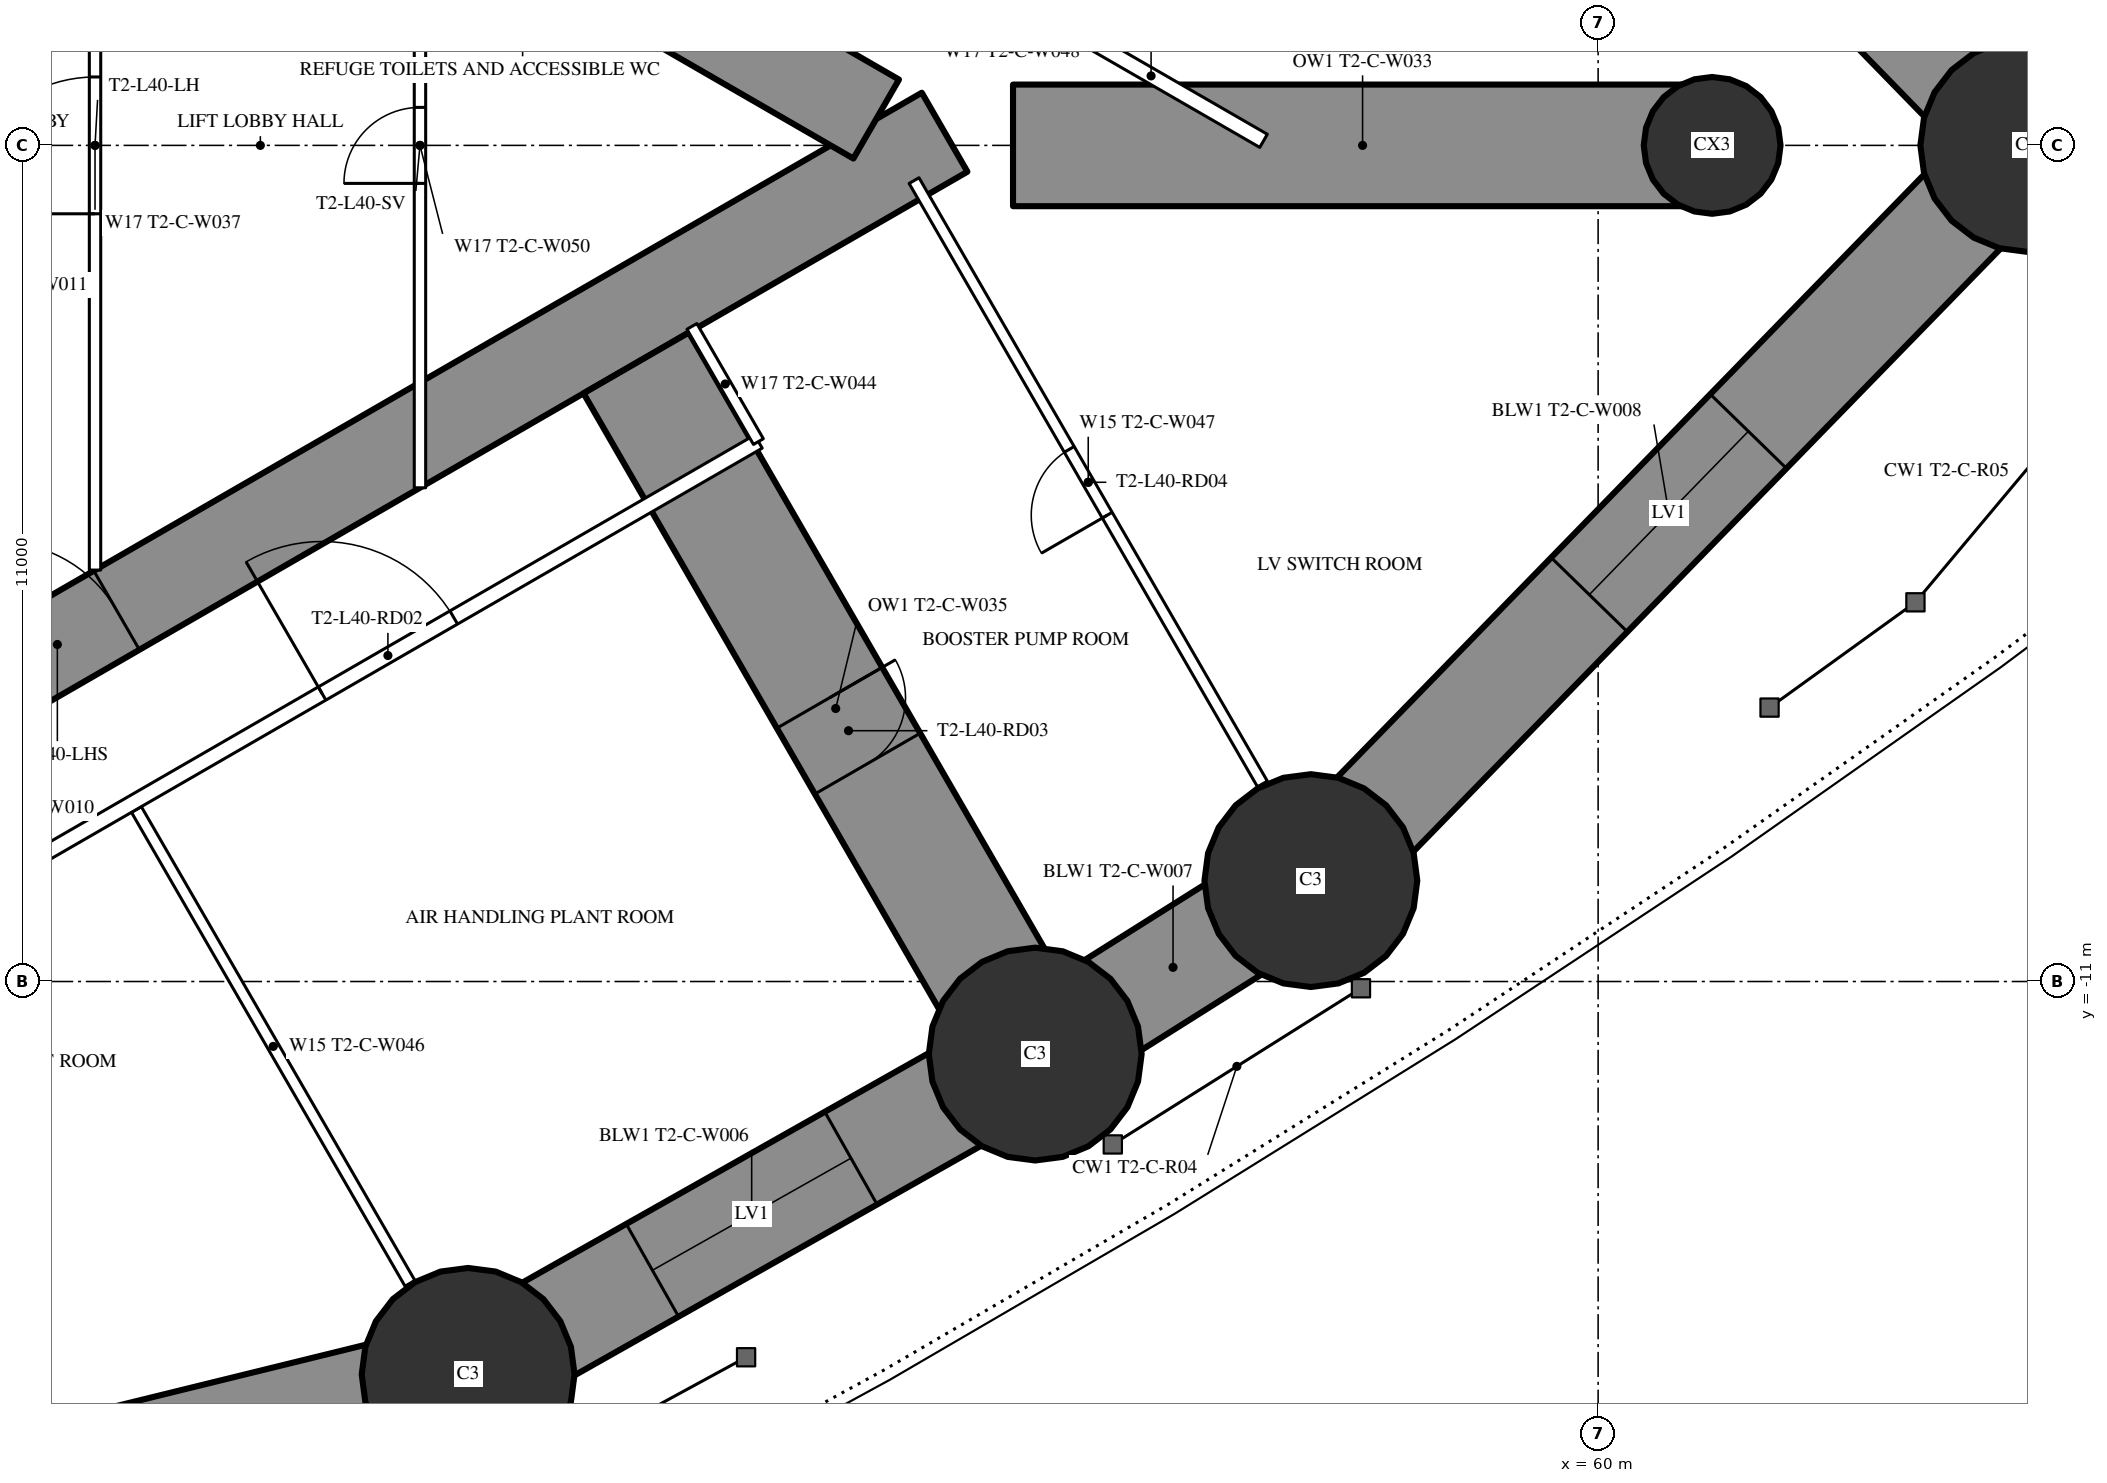
"""IFC4 building model, lengths in metres.
Left out: names, types, materials, properties, quantities, classifications, styles, units other than length and angle.
Written with IfcOpenShell. Run it as: python <this file> out.ifc"""

import sys

from ifc_helpers import new_model, si_unit, direction, frame, frame_2d, origin, origin_2d, place, context, subcontext, project, spatial, rectangle, circle, extrude, element, fill, save


model = new_model("IFC4")
c1 = context("Model", 3, precision=1e-05, world=origin(), true_north=direction((0.0, 1.0)))
c2 = subcontext(c1, "Body", "Model", "MODEL_VIEW")
j1 = project(units=[si_unit("LENGTHUNIT", "METRE"), si_unit("PLANEANGLEUNIT", "RADIAN")], contexts=[c1])
p1 = place(None, origin())
s1 = spatial("IfcSite", under=j1, at=p1, CompositionType="ELEMENT")
p2 = place(p1, origin())
s2 = spatial("IfcBuilding", under=s1, at=p2, CompositionType="ELEMENT")
p3 = place(p2, frame((0.0, 0.0, 152.7)))
s3 = spatial("IfcBuildingStorey", under=s2, at=p3, CompositionType="ELEMENT", Elevation=152.7)
for number, where, z_axis, x_axis in (
    (1, (65.64, 0.0, 0.0), (0.0, 0.0, 1.0), (1.0, 0.0, 0.0)),
    (2, (45.134, -16.168, 0.0), (0.0, 0.0, 1.0), (1.0, 0.0, 0.0)),
    (3, (52.594, -11.955, 0.0), (0.0, 0.0, 1.0), (1.0, 0.0, 0.0)),
    (4, (56.221, -9.672, 0.0), (0.0, 0.0, 1.0), (1.0, 0.0, 0.0)),
):
    element("IfcColumn", number, at=place(p3, frame(where, z_axis=z_axis, x_axis=x_axis)), inside=s3, PredefinedType="COLUMN", context=c2, shape_type="SweptSolid", body=[
        extrude(circle(Radius=1.4, at=origin_2d()), origin(), (0.0, 0.0, 1.0), 3.6),
    ])
p4 = place(p3, frame((61.5, 0.0, 0.0), z_axis=(0.0, 0.0, 1.0), x_axis=(1.0, 0.0, 0.0)))
e5 = element("IfcColumn", 5, at=p4, inside=s3, PredefinedType="COLUMN", context=c2, shape_type="SweptSolid", body=[
    extrude(circle(Radius=0.9, at=origin_2d()), origin(), (0.0, 0.0, 1.0), 3.6),
])
p5 = place(p3, frame((27.2, -13.8, 0.0), z_axis=(0.0, 0.0, 1.0), x_axis=(0.866027159892, 0.499996958321, 0.0)))
e6 = element("IfcWall", 6, at=p5, inside=s3, PredefinedType="SHEAR", context=c2, shape_type="SweptSolid", body=[
    extrude(rectangle(XDim=27.947, YDim=1.2, at=frame_2d((13.973, 0.0))), origin(), (0.0, 0.0, 1.0), 3.6),
])
p6 = place(p5, frame((4.6, 0.0, 0.0)))
e7 = element("IfcOpeningElement", 7, at=p6, cuts=e6, PredefinedType="OPENING", context=c2, shape_type="SweptSolid", body=[
    extrude(rectangle(XDim=1.0, YDim=2.2, at=frame_2d((0.5, 1.1))), frame((0.0, 0.61, 0.0), z_axis=(0.0, -1.0, 0.0), x_axis=(1.0, 0.0, 0.0)), (0.0, 0.0, 1.0), 1.22),
])
p7 = place(p5, frame((13.568, 0.0, 0.0)))
e8 = element("IfcOpeningElement", 8, at=p7, cuts=e6, PredefinedType="OPENING", context=c2, shape_type="SweptSolid", body=[
    extrude(rectangle(XDim=1.8, YDim=2.04, at=frame_2d((0.9, 1.02))), frame((0.0, 0.61, 0.0), z_axis=(0.0, -1.0, 0.0), x_axis=(1.0, 0.0, 0.0)), (0.0, 0.0, 1.0), 1.22),
])
p8 = place(p3, frame((27.2, 13.8, 0.0), z_axis=(0.0, 0.0, 1.0), x_axis=(0.866024515034, -0.500001539357, 0.0)))
e9 = element("IfcWall", 9, at=p8, inside=s3, PredefinedType="SHEAR", context=c2, shape_type="SweptSolid", body=[
    extrude(rectangle(XDim=26.907, YDim=1.2, at=frame_2d((13.454, 0.0))), origin(), (0.0, 0.0, 1.0), 3.6),
])
p9 = place(p8, frame((4.6, 0.0, 0.0)))
e10 = element("IfcOpeningElement", 10, at=p9, cuts=e9, PredefinedType="OPENING", context=c2, shape_type="SweptSolid", body=[
    extrude(rectangle(XDim=1.0, YDim=2.2, at=frame_2d((0.5, 1.1))), frame((0.0, 0.61, 0.0), z_axis=(0.0, -1.0, 0.0), x_axis=(1.0, 0.0, 0.0)), (0.0, 0.0, 1.0), 1.22),
])
p10 = place(p8, frame((13.568, 0.0, 0.0)))
e11 = element("IfcOpeningElement", 11, at=p10, cuts=e9, PredefinedType="OPENING", context=c2, shape_type="SweptSolid", body=[
    extrude(rectangle(XDim=1.8, YDim=2.04, at=frame_2d((0.9, 1.02))), frame((0.0, 0.61, 0.0), z_axis=(0.0, -1.0, 0.0), x_axis=(1.0, 0.0, 0.0)), (0.0, 0.0, 1.0), 1.22),
])
p11 = place(p3, frame((47.345, -2.862, 0.0), z_axis=(0.0, 0.0, 1.0), x_axis=(0.500012973899, -0.866017913171, 0.0)))
e12 = element("IfcWall", 12, at=p11, inside=s3, PredefinedType="SHEAR", context=c2, shape_type="SweptSolid", body=[
    extrude(rectangle(XDim=10.499, YDim=1.6, at=frame_2d((5.25, 0.0))), origin(), (0.0, 0.0, 1.0), 3.6),
])
p12 = place(p11, frame((5.087, 0.0, 0.0)))
e13 = element("IfcOpeningElement", 13, at=p12, cuts=e12, PredefinedType="OPENING", context=c2, shape_type="SweptSolid", body=[
    extrude(rectangle(XDim=1.0, YDim=2.2, at=frame_2d((0.5, 1.1))), frame((0.0, 0.81, 0.0), z_axis=(0.0, -1.0, 0.0), x_axis=(1.0, 0.0, 0.0)), (0.0, 0.0, 1.0), 1.62),
])
p13 = place(p3, frame((52.302, 0.0, 0.0), z_axis=(0.0, 0.0, 1.0), x_axis=(1.0, 0.0, 0.0)))
e14 = element("IfcWall", 14, at=p13, inside=s3, PredefinedType="SHEAR", context=c2, shape_type="SweptSolid", body=[
    extrude(rectangle(XDim=9.198, YDim=1.6, at=frame_2d((4.599, 0.0))), origin(), (0.0, 0.0, 1.0), 3.6),
])
p14 = place(p3, frame((31.76, -19.456, 0.0), z_axis=(0.0, 0.0, 1.0), x_axis=(0.971093253227, 0.238700426344, 0.0)))
e15 = element("IfcWall", 15, at=p14, inside=s3, PredefinedType="SHEAR", context=c2, shape_type="SweptSolid", body=[
    extrude(rectangle(XDim=13.772, YDim=1.4, at=frame_2d((6.886, 0.0))), origin(), (0.0, 0.0, 1.0), 3.6),
])
p15 = place(p14, frame((5.386, 0.0, 0.6)))
e16 = element("IfcOpeningElement", 16, at=p15, cuts=e15, PredefinedType="OPENING", context=c2, shape_type="SweptSolid", body=[
    extrude(rectangle(XDim=3.0, YDim=1.2, at=frame_2d((1.5, 0.6))), frame((0.0, 0.71, 0.0), z_axis=(0.0, -1.0, 0.0), x_axis=(1.0, 0.0, 0.0)), (0.0, 0.0, 1.0), 1.42),
])
p16 = place(p3, frame((45.134, -16.168, 0.0), z_axis=(0.0, 0.0, 1.0), x_axis=(0.870721990329, 0.491775574381, 0.0)))
e17 = element("IfcWall", 17, at=p16, inside=s3, PredefinedType="SHEAR", context=c2, shape_type="SweptSolid", body=[
    extrude(rectangle(XDim=8.569, YDim=1.4, at=frame_2d((4.284, 0.0))), origin(), (0.0, 0.0, 1.0), 3.6),
])
p17 = place(p16, frame((2.784, 0.0, 0.6)))
e18 = element("IfcOpeningElement", 18, at=p17, cuts=e17, PredefinedType="OPENING", context=c2, shape_type="SweptSolid", body=[
    extrude(rectangle(XDim=3.0, YDim=1.2, at=frame_2d((1.5, 0.6))), frame((0.0, 0.71, 0.0), z_axis=(0.0, -1.0, 0.0), x_axis=(1.0, 0.0, 0.0)), (0.0, 0.0, 1.0), 1.42),
])
p18 = place(p3, frame((52.594, -11.955, 0.0), z_axis=(0.0, 0.0, 1.0), x_axis=(0.846348902569, 0.532628890617, 0.0)))
e19 = element("IfcWall", 19, at=p18, inside=s3, PredefinedType="SHEAR", context=c2, shape_type="SweptSolid", body=[
    extrude(rectangle(XDim=4.285, YDim=1.4, at=frame_2d((2.143, 0.0))), origin(), (0.0, 0.0, 1.0), 3.6),
])
p19 = place(p3, frame((56.221, -9.672, 0.0), z_axis=(0.0, 0.0, 1.0), x_axis=(0.697649905443, 0.716438838587, 0.0)))
e20 = element("IfcWall", 20, at=p19, inside=s3, PredefinedType="SHEAR", context=c2, shape_type="SweptSolid", body=[
    extrude(rectangle(XDim=13.501, YDim=1.4, at=frame_2d((6.75, 0.0))), origin(), (0.0, 0.0, 1.0), 3.6),
])
p20 = place(p19, frame((5.25, 0.0, 0.6)))
e21 = element("IfcOpeningElement", 21, at=p20, cuts=e20, PredefinedType="OPENING", context=c2, shape_type="SweptSolid", body=[
    extrude(rectangle(XDim=3.0, YDim=1.2, at=frame_2d((1.5, 0.6))), frame((0.0, 0.71, 0.0), z_axis=(0.0, -1.0, 0.0), x_axis=(1.0, 0.0, 0.0)), (0.0, 0.0, 1.0), 1.42),
])
p21 = place(p3, frame((65.64, 0.0, 0.0), z_axis=(0.0, 0.0, 1.0), x_axis=(-0.697649905443, 0.716438838587, 0.0)))
e22 = element("IfcWall", 22, at=p21, inside=s3, PredefinedType="SHEAR", context=c2, shape_type="SweptSolid", body=[
    extrude(rectangle(XDim=13.501, YDim=1.4, at=frame_2d((6.75, 0.0))), origin(), (0.0, 0.0, 1.0), 3.6),
])
p22 = place(p21, frame((5.25, 0.0, 0.6)))
e23 = element("IfcOpeningElement", 23, at=p22, cuts=e22, PredefinedType="OPENING", context=c2, shape_type="SweptSolid", body=[
    extrude(rectangle(XDim=3.0, YDim=1.2, at=frame_2d((1.5, 0.6))), frame((0.0, 0.71, 0.0), z_axis=(0.0, -1.0, 0.0), x_axis=(1.0, 0.0, 0.0)), (0.0, 0.0, 1.0), 1.42),
])
p23 = place(p3, frame((40.769, -8.737, 0.0), z_axis=(0.0, 0.0, 1.0), x_axis=(0.500013115284, -0.866017831539, 0.0)))
e24 = element("IfcWall", 24, at=p23, inside=s3, PredefinedType="PARTITIONING", context=c2, shape_type="SweptSolid", body=[
    extrude(rectangle(XDim=7.198, YDim=0.15, at=frame_2d((3.599, 0.0))), origin(), (0.0, 0.0, 1.0), 2.4),
])
p24 = place(p3, frame((55.583, -8.401, 0.0), z_axis=(0.0, 0.0, 1.0), x_axis=(-0.499997575924, 0.866026803321, 0.0)))
e25 = element("IfcWall", 25, at=p24, inside=s3, PredefinedType="PARTITIONING", context=c2, shape_type="SweptSolid", body=[
    extrude(rectangle(XDim=9.167, YDim=0.15, at=frame_2d((4.583, 0.0))), origin(), (0.0, 0.0, 1.0), 3.35),
])
p25 = place(p24, frame((4.083, 0.0, 0.0)))
e26 = element("IfcOpeningElement", 26, at=p25, cuts=e25, PredefinedType="OPENING", context=c2, shape_type="SweptSolid", body=[
    extrude(rectangle(XDim=1.0, YDim=2.2, at=frame_2d((0.5, 1.1))), frame((0.0, 0.085, 0.0), z_axis=(0.0, -1.0, 0.0), x_axis=(1.0, 0.0, 0.0)), (0.0, 0.0, 1.0), 0.17),
])
p26 = place(p3, frame((52.639, 1.769, 0.0), z_axis=(0.0, 0.0, 1.0), x_axis=(0.866027340901, -0.4999966448, 0.0)))
e27 = element("IfcWall", 27, at=p26, inside=s3, PredefinedType="PARTITIONING", context=c2, shape_type="SweptSolid", body=[
    extrude(rectangle(XDim=3.417, YDim=0.2, at=frame_2d((1.708, 0.0))), origin(), (0.0, 0.0, 1.0), 3.35),
])
p27 = place(p3, frame((27.903, -16.05, 0.0), z_axis=(0.0, 0.0, 1.0), x_axis=(0.86602417537, 0.500002127671, 0.0)))
e28 = element("IfcWall", 28, at=p27, inside=s3, PredefinedType="PARTITIONING", context=c2, shape_type="SweptSolid", body=[
    extrude(rectangle(XDim=24.307, YDim=0.2, at=frame_2d((12.153, 0.0))), origin(), (0.0, 0.0, 1.0), 3.35),
])
p28 = place(p27, frame((4.162, 0.0, 0.0)))
e29 = element("IfcOpeningElement", 29, at=p28, cuts=e28, PredefinedType="OPENING", context=c2, shape_type="SweptSolid", body=[
    extrude(rectangle(XDim=2.0, YDim=2.4, at=frame_2d((1.0, 1.2))), frame((0.0, 0.11, 0.0), z_axis=(0.0, -1.0, 0.0), x_axis=(1.0, 0.0, 0.0)), (0.0, 0.0, 1.0), 0.22),
])
p29 = place(p27, frame((17.678, 0.0, 0.0)))
e30 = element("IfcOpeningElement", 30, at=p29, cuts=e28, PredefinedType="OPENING", context=c2, shape_type="SweptSolid", body=[
    extrude(rectangle(XDim=2.0, YDim=2.4, at=frame_2d((1.0, 1.2))), frame((0.0, 0.11, 0.0), z_axis=(0.0, -1.0, 0.0), x_axis=(1.0, 0.0, 0.0)), (0.0, 0.0, 1.0), 0.22),
])
p30 = place(p3, frame((48.953, -3.897, 0.0), z_axis=(0.0, 0.0, 1.0), x_axis=(-0.499980071345, 0.866036909293, 0.0)))
e31 = element("IfcWall", 31, at=p30, inside=s3, PredefinedType="PARTITIONING", context=c2, shape_type="SweptSolid", body=[
    extrude(rectangle(XDim=1.75, YDim=0.15, at=frame_2d((0.875, 0.0))), origin(), (0.0, 0.0, 1.0), 3.35),
])
p31 = place(p3, frame((40.225, -5.587, 0.0), z_axis=(0.0, 0.0, 1.0), x_axis=(0.0, 1.0, 0.0)))
e32 = element("IfcWall", 32, at=p31, inside=s3, PredefinedType="PARTITIONING", context=c2, shape_type="SweptSolid", body=[
    extrude(rectangle(XDim=11.174, YDim=0.15, at=frame_2d((5.587, 0.0))), origin(), (0.0, 0.0, 1.0), 3.35),
])
p32 = place(p31, frame((4.687, 0.0, 0.0)))
e33 = element("IfcOpeningElement", 33, at=p32, cuts=e32, PredefinedType="OPENING", context=c2, shape_type="SweptSolid", body=[
    extrude(rectangle(XDim=1.8, YDim=2.2, at=frame_2d((0.9, 1.1))), frame((0.0, 0.085, 0.0), z_axis=(0.0, -1.0, 0.0), x_axis=(1.0, 0.0, 0.0)), (0.0, 0.0, 1.0), 0.17),
])
p33 = place(p3, frame((44.5, -4.505, 0.0), z_axis=(0.0, 0.0, 1.0), x_axis=(0.0, 1.0, 0.0)))
e34 = element("IfcWall", 34, at=p33, inside=s3, PredefinedType="PARTITIONING", context=c2, shape_type="SweptSolid", body=[
    extrude(rectangle(XDim=9.009, YDim=0.15, at=frame_2d((4.505, 0.0))), origin(), (0.0, 0.0, 1.0), 3.35),
])
p34 = place(p33, frame((4.005, 0.0, 0.0)))
e35 = element("IfcOpeningElement", 35, at=p34, cuts=e34, PredefinedType="OPENING", context=c2, shape_type="SweptSolid", body=[
    extrude(rectangle(XDim=1.0, YDim=2.2, at=frame_2d((0.5, 1.1))), frame((0.0, 0.085, 0.0), z_axis=(0.0, -1.0, 0.0), x_axis=(1.0, 0.0, 0.0)), (0.0, 0.0, 1.0), 0.17),
])
p35 = place(p17, origin())
e36 = element("IfcWindow", 36, at=p35, inside=s3, PartitioningType="SINGLE_PANEL", PredefinedType="WINDOW", context=c2, shape_type="SweptSolid", body=[
    extrude(rectangle(XDim=3.0, YDim=1.2, at=frame_2d((1.5, 0.6))), frame((0.0, 0.03, 0.0), z_axis=(0.0, -1.0, 0.0), x_axis=(1.0, 0.0, 0.0)), (0.0, 0.0, 1.0), 0.06),
])
fill(e18, e36)
p36 = place(p20, origin())
e37 = element("IfcWindow", 37, at=p36, inside=s3, PartitioningType="SINGLE_PANEL", PredefinedType="WINDOW", context=c2, shape_type="SweptSolid", body=[
    extrude(rectangle(XDim=3.0, YDim=1.2, at=frame_2d((1.5, 0.6))), frame((0.0, 0.03, 0.0), z_axis=(0.0, -1.0, 0.0), x_axis=(1.0, 0.0, 0.0)), (0.0, 0.0, 1.0), 0.06),
])
fill(e21, e37)
p37 = place(p29, origin())
e38 = element("IfcDoor", 38, at=p37, inside=s3, OperationType="DOUBLE_DOOR_SINGLE_SWING", PredefinedType="DOOR", context=c2, shape_type="SweptSolid", body=[
    extrude(rectangle(XDim=2.0, YDim=2.4, at=frame_2d((1.0, 1.2))), frame((0.0, 0.025, 0.0), z_axis=(0.0, -1.0, 0.0), x_axis=(1.0, 0.0, 0.0)), (0.0, 0.0, 1.0), 0.05),
])
fill(e30, e38)
p38 = place(p12, origin())
e39 = element("IfcDoor", 39, at=p38, inside=s3, OperationType="SINGLE_SWING_LEFT", PredefinedType="DOOR", context=c2, shape_type="SweptSolid", body=[
    extrude(rectangle(XDim=1.0, YDim=2.2, at=frame_2d((0.5, 1.1))), frame((0.0, 0.025, 0.0), z_axis=(0.0, -1.0, 0.0), x_axis=(1.0, 0.0, 0.0)), (0.0, 0.0, 1.0), 0.05),
])
fill(e13, e39)
p39 = place(p25, origin())
e40 = element("IfcDoor", 40, at=p39, inside=s3, OperationType="SINGLE_SWING_LEFT", PredefinedType="DOOR", context=c2, shape_type="SweptSolid", body=[
    extrude(rectangle(XDim=1.0, YDim=2.2, at=frame_2d((0.5, 1.1))), frame((0.0, 0.025, 0.0), z_axis=(0.0, -1.0, 0.0), x_axis=(1.0, 0.0, 0.0)), (0.0, 0.0, 1.0), 0.05),
])
fill(e26, e40)
p40 = place(p32, origin())
e41 = element("IfcDoor", 41, at=p40, inside=s3, OperationType="DOUBLE_DOOR_SINGLE_SWING", PredefinedType="DOOR", context=c2, shape_type="SweptSolid", body=[
    extrude(rectangle(XDim=1.8, YDim=2.2, at=frame_2d((0.9, 1.1))), frame((0.0, 0.025, 0.0), z_axis=(0.0, -1.0, 0.0), x_axis=(1.0, 0.0, 0.0)), (0.0, 0.0, 1.0), 0.05),
])
fill(e33, e41)
p41 = place(p34, origin())
e42 = element("IfcDoor", 42, at=p41, inside=s3, OperationType="SINGLE_SWING_LEFT", PredefinedType="DOOR", context=c2, shape_type="SweptSolid", body=[
    extrude(rectangle(XDim=1.0, YDim=2.2, at=frame_2d((0.5, 1.1))), frame((0.0, 0.025, 0.0), z_axis=(0.0, -1.0, 0.0), x_axis=(1.0, 0.0, 0.0)), (0.0, 0.0, 1.0), 0.05),
])
fill(e35, e42)
p42 = place(p7, origin())
e43 = element("IfcDoor", 43, at=p42, inside=s3, OperationType="DOUBLE_DOOR_SINGLE_SWING", PredefinedType="DOOR", context=c2, shape_type="SweptSolid", body=[
    extrude(rectangle(XDim=1.8, YDim=2.04, at=frame_2d((0.9, 1.02))), frame((0.0, 0.025, 0.0), z_axis=(0.0, -1.0, 0.0), x_axis=(1.0, 0.0, 0.0)), (0.0, 0.0, 1.0), 0.05),
])
fill(e8, e43)
save(model, sys.argv[1])
